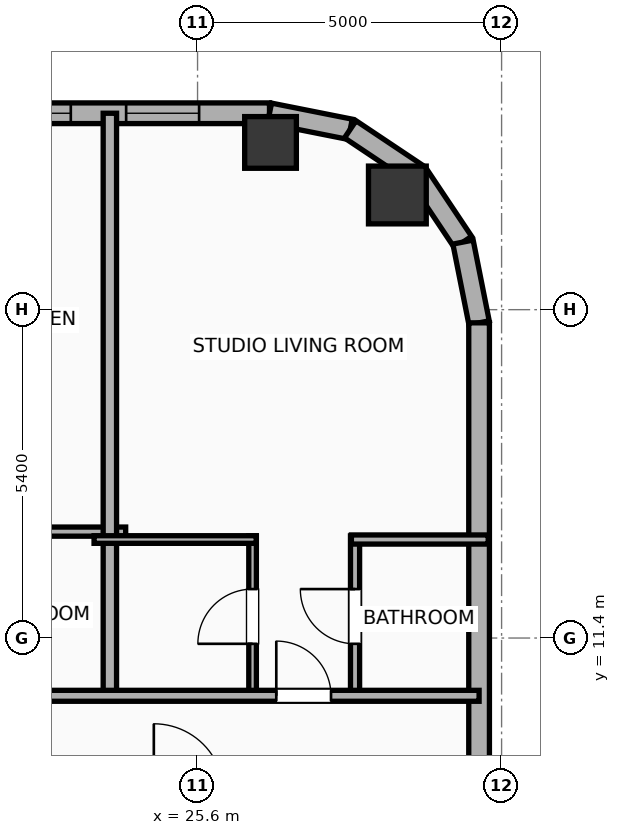
"""IFC4 building model, lengths in metres.
Left out: names, types, materials, properties, quantities, classifications, styles, units other than length and angle.
Written with IfcOpenShell. Run it as: python <this file> out.ifc"""

import sys

from ifc_helpers import new_model, si_unit, direction, frame, frame_2d, origin, origin_2d, place, context, subcontext, project, spatial, rectangle, hollow_rectangle, hollow_circle, extrude, element, fill, save


model = new_model("IFC4")
c1 = context("Model", 3, precision=1e-05, world=origin(), true_north=direction((0.0, 1.0)))
c2 = subcontext(c1, "Body", "Model", "MODEL_VIEW")
j1 = project(units=[si_unit("LENGTHUNIT", "METRE"), si_unit("PLANEANGLEUNIT", "RADIAN")], contexts=[c1])
p1 = place(None, origin())
s1 = spatial("IfcSite", under=j1, at=p1, CompositionType="ELEMENT")
p2 = place(p1, origin())
s2 = spatial("IfcBuilding", under=s1, at=p2, CompositionType="ELEMENT")
p3 = place(p2, frame((0.0, 0.0, 250.9)))
s3 = spatial("IfcBuildingStorey", under=s2, at=p3, CompositionType="ELEMENT", Elevation=250.9)
p4 = place(p3, frame((28.886, 18.686, 0.0), z_axis=(0.0, 0.0, 1.0), x_axis=(1.0, 0.0, 0.0)))
e1 = element("IfcColumn", 1, at=p4, inside=s3, PredefinedType="COLUMN", context=c2, shape_type="SweptSolid", body=[
    extrude(hollow_circle(Radius=0.475, WallThickness=0.032, at=origin_2d()), origin(), (0.0, 0.0, 1.0), 3.865),
])
p5 = place(p3, frame((26.8, 19.55, 0.0), z_axis=(0.0, 0.0, 1.0), x_axis=(1.0, 0.0, 0.0)))
e2 = element("IfcColumn", 2, at=p5, inside=s3, PredefinedType="COLUMN", context=c2, shape_type="SweptSolid", body=[
    extrude(hollow_rectangle(XDim=0.85, YDim=0.85, WallThickness=0.028, at=origin_2d()), origin(), (0.0, 0.0, 1.0), 3.865),
])
p6 = place(p3, frame((-22.783, 20.03, 0.0), z_axis=(0.0, 0.0, 1.0), x_axis=(1.0, 0.0, 0.0)))
e3 = element("IfcWall", 3, at=p6, inside=s3, PredefinedType="ELEMENTEDWALL", context=c2, shape_type="SweptSolid", body=[
    extrude(rectangle(XDim=49.566, YDim=0.34, at=frame_2d((24.783, 0.0))), origin(), (0.0, 0.0, 1.0), 2.39),
])
p7 = place(p6, frame((25.233, 0.0, 0.75)))
e4 = element("IfcOpeningElement", 4, at=p7, cuts=e3, PredefinedType="OPENING", context=c2, shape_type="SweptSolid", body=[
    extrude(rectangle(XDim=2.4, YDim=1.45, at=frame_2d((1.2, 0.725))), frame((0.0, 0.18, 0.0), z_axis=(0.0, -1.0, 0.0), x_axis=(1.0, 0.0, 0.0)), (0.0, 0.0, 1.0), 0.36),
])
p8 = place(p6, frame((41.756, 0.0, 0.75)))
e5 = element("IfcOpeningElement", 5, at=p8, cuts=e3, PredefinedType="OPENING", context=c2, shape_type="SweptSolid", body=[
    extrude(rectangle(XDim=2.4, YDim=1.45, at=frame_2d((1.2, 0.725))), frame((0.0, 0.18, 0.0), z_axis=(0.0, -1.0, 0.0), x_axis=(1.0, 0.0, 0.0)), (0.0, 0.0, 1.0), 0.36),
])
p9 = place(p6, frame((1.637, 0.0, 0.55)))
e6 = element("IfcOpeningElement", 6, at=p9, cuts=e3, PredefinedType="OPENING", context=c2, shape_type="SweptSolid", body=[
    extrude(rectangle(XDim=1.2, YDim=1.15, at=frame_2d((0.6, 0.575))), frame((0.0, 0.18, 0.0), z_axis=(0.0, -1.0, 0.0), x_axis=(1.0, 0.0, 0.0)), (0.0, 0.0, 1.0), 0.36),
])
p10 = place(p6, frame((8.019, 0.0, 0.55)))
e7 = element("IfcOpeningElement", 7, at=p10, cuts=e3, PredefinedType="OPENING", context=c2, shape_type="SweptSolid", body=[
    extrude(rectangle(XDim=1.2, YDim=1.15, at=frame_2d((0.6, 0.575))), frame((0.0, 0.18, 0.0), z_axis=(0.0, -1.0, 0.0), x_axis=(1.0, 0.0, 0.0)), (0.0, 0.0, 1.0), 0.36),
])
p11 = place(p6, frame((4.524, 0.0, 0.55)))
e8 = element("IfcOpeningElement", 8, at=p11, cuts=e3, PredefinedType="OPENING", context=c2, shape_type="SweptSolid", body=[
    extrude(rectangle(XDim=1.2, YDim=1.15, at=frame_2d((0.6, 0.575))), frame((0.0, 0.18, 0.0), z_axis=(0.0, -1.0, 0.0), x_axis=(1.0, 0.0, 0.0)), (0.0, 0.0, 1.0), 0.36),
])
p12 = place(p6, frame((11.678, 0.0, 0.55)))
e9 = element("IfcOpeningElement", 9, at=p12, cuts=e3, PredefinedType="OPENING", context=c2, shape_type="SweptSolid", body=[
    extrude(rectangle(XDim=1.2, YDim=1.15, at=frame_2d((0.6, 0.575))), frame((0.0, 0.18, 0.0), z_axis=(0.0, -1.0, 0.0), x_axis=(1.0, 0.0, 0.0)), (0.0, 0.0, 1.0), 0.36),
])
p13 = place(p6, frame((17.993, 0.0, 0.55)))
e10 = element("IfcOpeningElement", 10, at=p13, cuts=e3, PredefinedType="OPENING", context=c2, shape_type="SweptSolid", body=[
    extrude(rectangle(XDim=1.2, YDim=1.15, at=frame_2d((0.6, 0.575))), frame((0.0, 0.18, 0.0), z_axis=(0.0, -1.0, 0.0), x_axis=(1.0, 0.0, 0.0)), (0.0, 0.0, 1.0), 0.36),
])
p14 = place(p6, frame((15.138, 0.0, 0.55)))
e11 = element("IfcOpeningElement", 11, at=p14, cuts=e3, PredefinedType="OPENING", context=c2, shape_type="SweptSolid", body=[
    extrude(rectangle(XDim=1.2, YDim=1.15, at=frame_2d((0.6, 0.575))), frame((0.0, 0.18, 0.0), z_axis=(0.0, -1.0, 0.0), x_axis=(1.0, 0.0, 0.0)), (0.0, 0.0, 1.0), 0.36),
])
p15 = place(p6, frame((22.278, 0.0, 0.55)))
e12 = element("IfcOpeningElement", 12, at=p15, cuts=e3, PredefinedType="OPENING", context=c2, shape_type="SweptSolid", body=[
    extrude(rectangle(XDim=1.2, YDim=1.15, at=frame_2d((0.6, 0.575))), frame((0.0, 0.18, 0.0), z_axis=(0.0, -1.0, 0.0), x_axis=(1.0, 0.0, 0.0)), (0.0, 0.0, 1.0), 0.36),
])
p16 = place(p6, frame((30.384, 0.0, 0.55)))
e13 = element("IfcOpeningElement", 13, at=p16, cuts=e3, PredefinedType="OPENING", context=c2, shape_type="SweptSolid", body=[
    extrude(rectangle(XDim=0.85, YDim=1.15, at=frame_2d((0.425, 0.575))), frame((0.0, 0.18, 0.0), z_axis=(0.0, -1.0, 0.0), x_axis=(1.0, 0.0, 0.0)), (0.0, 0.0, 1.0), 0.36),
])
p17 = place(p6, frame((32.603, 0.0, 0.55)))
e14 = element("IfcOpeningElement", 14, at=p17, cuts=e3, PredefinedType="OPENING", context=c2, shape_type="SweptSolid", body=[
    extrude(rectangle(XDim=1.2, YDim=1.15, at=frame_2d((0.6, 0.575))), frame((0.0, 0.18, 0.0), z_axis=(0.0, -1.0, 0.0), x_axis=(1.0, 0.0, 0.0)), (0.0, 0.0, 1.0), 0.36),
])
p18 = place(p6, frame((37.223, 0.0, 0.55)))
e15 = element("IfcOpeningElement", 15, at=p18, cuts=e3, PredefinedType="OPENING", context=c2, shape_type="SweptSolid", body=[
    extrude(rectangle(XDim=1.2, YDim=1.15, at=frame_2d((0.6, 0.575))), frame((0.0, 0.18, 0.0), z_axis=(0.0, -1.0, 0.0), x_axis=(1.0, 0.0, 0.0)), (0.0, 0.0, 1.0), 0.36),
])
p19 = place(p6, frame((45.099, 0.0, 0.55)))
e16 = element("IfcOpeningElement", 16, at=p19, cuts=e3, PredefinedType="OPENING", context=c2, shape_type="SweptSolid", body=[
    extrude(rectangle(XDim=1.2, YDim=1.15, at=frame_2d((0.6, 0.575))), frame((0.0, 0.18, 0.0), z_axis=(0.0, -1.0, 0.0), x_axis=(1.0, 0.0, 0.0)), (0.0, 0.0, 1.0), 0.36),
])
p20 = place(p6, frame((47.209, 0.0, 0.55)))
e17 = element("IfcOpeningElement", 17, at=p20, cuts=e3, PredefinedType="OPENING", context=c2, shape_type="SweptSolid", body=[
    extrude(rectangle(XDim=1.2, YDim=1.15, at=frame_2d((0.6, 0.575))), frame((0.0, 0.18, 0.0), z_axis=(0.0, -1.0, 0.0), x_axis=(1.0, 0.0, 0.0)), (0.0, 0.0, 1.0), 0.36),
])
p21 = place(p3, frame((26.783, 20.03, 0.0), z_axis=(0.0, 0.0, 1.0), x_axis=(0.980788153188, -0.195075878998, 0.0)))
e18 = element("IfcWall", 18, at=p21, inside=s3, PredefinedType="ELEMENTEDWALL", context=c2, shape_type="SweptSolid", body=[
    extrude(rectangle(XDim=1.354, YDim=0.34, at=frame_2d((0.677, 0.0))), origin(), (0.0, 0.0, 1.0), 2.39),
])
p22 = place(p3, frame((28.111, 19.766, 0.0), z_axis=(0.0, 0.0, 1.0), x_axis=(0.831403586725, -0.555669034571, 0.0)))
e19 = element("IfcWall", 19, at=p22, inside=s3, PredefinedType="ELEMENTEDWALL", context=c2, shape_type="SweptSolid", body=[
    extrude(rectangle(XDim=1.337, YDim=0.34, at=frame_2d((0.668, 0.0))), origin(), (0.0, 0.0, 1.0), 2.39),
])
p23 = place(p3, frame((29.223, 19.023, 0.0), z_axis=(0.0, 0.0, 1.0), x_axis=(0.555669034571, -0.831403586725, 0.0)))
e20 = element("IfcWall", 20, at=p23, inside=s3, PredefinedType="ELEMENTEDWALL", context=c2, shape_type="SweptSolid", body=[
    extrude(rectangle(XDim=1.337, YDim=0.34, at=frame_2d((0.668, 0.0))), origin(), (0.0, 0.0, 1.0), 3.5),
])
p24 = place(p3, frame((29.966, 17.911, 0.0), z_axis=(0.0, 0.0, 1.0), x_axis=(0.195075878998, -0.980788153188, 0.0)))
e21 = element("IfcWall", 21, at=p24, inside=s3, PredefinedType="ELEMENTEDWALL", context=c2, shape_type="SweptSolid", body=[
    extrude(rectangle(XDim=1.354, YDim=0.34, at=frame_2d((0.677, 0.0))), origin(), (0.0, 0.0, 1.0), 3.5),
])
p25 = place(p3, frame((30.23, 16.583, 0.0), z_axis=(0.0, 0.0, 1.0), x_axis=(0.0, -1.0, 0.0)))
e22 = element("IfcWall", 22, at=p25, inside=s3, PredefinedType="ELEMENTEDWALL", context=c2, shape_type="SweptSolid", body=[
    extrude(rectangle(XDim=31.967, YDim=0.34, at=frame_2d((15.983, 0.0))), origin(), (0.0, 0.0, 1.0), 2.39),
])
p26 = place(p25, frame((30.106, 0.0, 0.55)))
e23 = element("IfcOpeningElement", 23, at=p26, cuts=e22, PredefinedType="OPENING", context=c2, shape_type="SweptSolid", body=[
    extrude(rectangle(XDim=1.2, YDim=1.15, at=frame_2d((0.6, 0.575))), frame((0.0, 0.18, 0.0), z_axis=(0.0, -1.0, 0.0), x_axis=(1.0, 0.0, 0.0)), (0.0, 0.0, 1.0), 0.36),
])
p27 = place(p25, frame((11.463, 0.0, 0.55)))
e24 = element("IfcOpeningElement", 24, at=p27, cuts=e22, PredefinedType="OPENING", context=c2, shape_type="SweptSolid", body=[
    extrude(rectangle(XDim=1.2, YDim=1.15, at=frame_2d((0.6, 0.575))), frame((0.0, 0.18, 0.0), z_axis=(0.0, -1.0, 0.0), x_axis=(1.0, 0.0, 0.0)), (0.0, 0.0, 1.0), 0.36),
])
p28 = place(p25, frame((20.363, 0.0, 0.55)))
e25 = element("IfcOpeningElement", 25, at=p28, cuts=e22, PredefinedType="OPENING", context=c2, shape_type="SweptSolid", body=[
    extrude(rectangle(XDim=1.2, YDim=1.15, at=frame_2d((0.6, 0.575))), frame((0.0, 0.18, 0.0), z_axis=(0.0, -1.0, 0.0), x_axis=(1.0, 0.0, 0.0)), (0.0, 0.0, 1.0), 0.36),
])
p29 = place(p3, frame((21.593, 13.15, 0.0), z_axis=(0.0, 0.0, 1.0), x_axis=(1.0, 0.0, 0.0)))
e26 = element("IfcWall", 26, at=p29, inside=s3, PredefinedType="PLUMBINGWALL", context=c2, shape_type="SweptSolid", body=[
    extrude(rectangle(XDim=2.825, YDim=0.15, at=frame_2d((1.413, 0.0))), origin(), (0.0, 0.0, 1.0), 3.5),
])
p30 = place(p3, frame((24.158, 10.37, 0.0), z_axis=(0.0, 0.0, 1.0), x_axis=(0.0, 1.0, 0.0)))
e27 = element("IfcWall", 27, at=p30, inside=s3, PredefinedType="PARTITIONING", context=c2, shape_type="SweptSolid", body=[
    extrude(rectangle(XDim=9.66, YDim=0.22, at=frame_2d((4.83, 0.0))), origin(), (0.0, 0.0, 1.0), 2.39),
])
p31 = place(p3, frame((26.505, 10.43, 0.0), z_axis=(0.0, 0.0, 1.0), x_axis=(0.0, 1.0, 0.0)))
e28 = element("IfcWall", 28, at=p31, inside=s3, PredefinedType="PARTITIONING", context=c2, shape_type="SweptSolid", body=[
    extrude(rectangle(XDim=2.65, YDim=0.125, at=frame_2d((1.325, 0.0))), origin(), (0.0, 0.0, 1.0), 3.5),
])
p32 = place(p31, frame((0.875, 0.0, 0.0)))
e29 = element("IfcOpeningElement", 29, at=p32, cuts=e28, PredefinedType="OPENING", context=c2, shape_type="SweptSolid", body=[
    extrude(rectangle(XDim=0.9, YDim=2.05, at=frame_2d((0.45, 1.025))), frame((0.0, 0.073, 0.0), z_axis=(0.0, -1.0, 0.0), x_axis=(1.0, 0.0, 0.0)), (0.0, 0.0, 1.0), 0.145),
])
p33 = place(p3, frame((28.19, 10.43, 0.0), z_axis=(0.0, 0.0, 1.0), x_axis=(0.0, 1.0, 0.0)))
e30 = element("IfcWall", 30, at=p33, inside=s3, PredefinedType="PLUMBINGWALL", context=c2, shape_type="SweptSolid", body=[
    extrude(rectangle(XDim=2.65, YDim=0.15, at=frame_2d((1.325, 0.0))), origin(), (0.0, 0.0, 1.0), 3.5),
])
p34 = place(p33, frame((0.875, 0.0, 0.0)))
e31 = element("IfcOpeningElement", 31, at=p34, cuts=e30, PredefinedType="OPENING", context=c2, shape_type="SweptSolid", body=[
    extrude(rectangle(XDim=0.9, YDim=2.05, at=frame_2d((0.45, 1.025))), frame((0.0, 0.085, 0.0), z_axis=(0.0, -1.0, 0.0), x_axis=(1.0, 0.0, 0.0)), (0.0, 0.0, 1.0), 0.17),
])
p35 = place(p3, frame((23.898, 13.02, 0.0), z_axis=(0.0, 0.0, 1.0), x_axis=(1.0, 0.0, 0.0)))
e32 = element("IfcWall", 32, at=p35, inside=s3, PredefinedType="PARTITIONING", context=c2, shape_type="SweptSolid", body=[
    extrude(rectangle(XDim=2.667, YDim=0.125, at=frame_2d((1.333, 0.0))), origin(), (0.0, 0.0, 1.0), 3.5),
])
p36 = place(p3, frame((28.13, 13.02, 0.0), z_axis=(0.0, 0.0, 1.0), x_axis=(1.0, 0.0, 0.0)))
e33 = element("IfcWall", 33, at=p36, inside=s3, PredefinedType="PLUMBINGWALL", context=c2, shape_type="SweptSolid", body=[
    extrude(rectangle(XDim=2.25, YDim=0.15, at=frame_2d((1.125, 0.0))), origin(), (0.0, 0.0, 1.0), 3.5),
])
p37 = place(p3, frame((-26.23, 10.45, 0.0), z_axis=(0.0, 0.0, 1.0), x_axis=(1.0, 0.0, 0.0)))
e34 = element("IfcWall", 34, at=p37, inside=s3, PredefinedType="PARTITIONING", context=c2, shape_type="SweptSolid", body=[
    extrude(rectangle(XDim=56.46, YDim=0.18, at=frame_2d((28.23, 0.0))), origin(), (0.0, 0.0, 1.0), 3.5),
])
p38 = place(p37, frame((3.072, 0.0, 0.0)))
e35 = element("IfcOpeningElement", 35, at=p38, cuts=e34, PredefinedType="OPENING", context=c2, shape_type="SweptSolid", body=[
    extrude(rectangle(XDim=1.15, YDim=2.05, at=frame_2d((0.575, 1.025))), frame((0.0, 0.1, 0.0), z_axis=(0.0, -1.0, 0.0), x_axis=(1.0, 0.0, 0.0)), (0.0, 0.0, 1.0), 0.2),
])
p39 = place(p37, frame((12.146, 0.0, 0.0)))
e36 = element("IfcOpeningElement", 36, at=p39, cuts=e34, PredefinedType="OPENING", context=c2, shape_type="SweptSolid", body=[
    extrude(rectangle(XDim=1.15, YDim=2.05, at=frame_2d((0.575, 1.025))), frame((0.0, 0.1, 0.0), z_axis=(0.0, -1.0, 0.0), x_axis=(1.0, 0.0, 0.0)), (0.0, 0.0, 1.0), 0.2),
])
p40 = place(p37, frame((22.302, 0.0, 0.0)))
e37 = element("IfcOpeningElement", 37, at=p40, cuts=e34, PredefinedType="OPENING", context=c2, shape_type="SweptSolid", body=[
    extrude(rectangle(XDim=1.15, YDim=2.05, at=frame_2d((0.575, 1.025))), frame((0.0, 0.1, 0.0), z_axis=(0.0, -1.0, 0.0), x_axis=(1.0, 0.0, 0.0)), (0.0, 0.0, 1.0), 0.2),
])
p41 = place(p37, frame((32.601, 0.0, 0.0)))
e38 = element("IfcOpeningElement", 38, at=p41, cuts=e34, PredefinedType="OPENING", context=c2, shape_type="SweptSolid", body=[
    extrude(rectangle(XDim=1.15, YDim=2.05, at=frame_2d((0.575, 1.025))), frame((0.0, 0.1, 0.0), z_axis=(0.0, -1.0, 0.0), x_axis=(1.0, 0.0, 0.0)), (0.0, 0.0, 1.0), 0.2),
])
p42 = place(p37, frame((40.941, 0.0, 0.0)))
e39 = element("IfcOpeningElement", 39, at=p42, cuts=e34, PredefinedType="OPENING", context=c2, shape_type="SweptSolid", body=[
    extrude(rectangle(XDim=0.9, YDim=2.05, at=frame_2d((0.45, 1.025))), frame((0.0, 0.1, 0.0), z_axis=(0.0, -1.0, 0.0), x_axis=(1.0, 0.0, 0.0)), (0.0, 0.0, 1.0), 0.2),
])
p43 = place(p37, frame((45.559, 0.0, 0.0)))
e40 = element("IfcOpeningElement", 40, at=p43, cuts=e34, PredefinedType="OPENING", context=c2, shape_type="SweptSolid", body=[
    extrude(rectangle(XDim=1.15, YDim=2.05, at=frame_2d((0.575, 1.025))), frame((0.0, 0.1, 0.0), z_axis=(0.0, -1.0, 0.0), x_axis=(1.0, 0.0, 0.0)), (0.0, 0.0, 1.0), 0.2),
])
p44 = place(p37, frame((53.125, 0.0, 0.0)))
e41 = element("IfcOpeningElement", 41, at=p44, cuts=e34, PredefinedType="OPENING", context=c2, shape_type="SweptSolid", body=[
    extrude(rectangle(XDim=0.9, YDim=2.05, at=frame_2d((0.45, 1.025))), frame((0.0, 0.1, 0.0), z_axis=(0.0, -1.0, 0.0), x_axis=(1.0, 0.0, 0.0)), (0.0, 0.0, 1.0), 0.2),
])
p45 = place(p19, origin())
e42 = element("IfcWindow", 42, at=p45, inside=s3, PartitioningType="SINGLE_PANEL", PredefinedType="WINDOW", context=c2, shape_type="SweptSolid", body=[
    extrude(rectangle(XDim=1.2, YDim=1.15, at=frame_2d((0.6, 0.575))), frame((0.0, 0.03, 0.0), z_axis=(0.0, -1.0, 0.0), x_axis=(1.0, 0.0, 0.0)), (0.0, 0.0, 1.0), 0.06),
])
fill(e16, e42)
p46 = place(p20, origin())
e43 = element("IfcWindow", 43, at=p46, inside=s3, PartitioningType="SINGLE_PANEL", PredefinedType="WINDOW", context=c2, shape_type="SweptSolid", body=[
    extrude(rectangle(XDim=1.2, YDim=1.15, at=frame_2d((0.6, 0.575))), frame((0.0, 0.03, 0.0), z_axis=(0.0, -1.0, 0.0), x_axis=(1.0, 0.0, 0.0)), (0.0, 0.0, 1.0), 0.06),
])
fill(e17, e43)
p47 = place(p32, origin())
e44 = element("IfcDoor", 44, at=p47, inside=s3, OperationType="SINGLE_SWING_LEFT", PredefinedType="DOOR", context=c2, shape_type="SweptSolid", body=[
    extrude(rectangle(XDim=0.9, YDim=2.05, at=frame_2d((0.45, 1.025))), frame((0.0, 0.025, 0.0), z_axis=(0.0, -1.0, 0.0), x_axis=(1.0, 0.0, 0.0)), (0.0, 0.0, 1.0), 0.05),
])
fill(e29, e44)
p48 = place(p34, origin())
e45 = element("IfcDoor", 45, at=p48, inside=s3, OperationType="SINGLE_SWING_RIGHT", PredefinedType="DOOR", context=c2, shape_type="SweptSolid", body=[
    extrude(rectangle(XDim=0.9, YDim=2.05, at=frame_2d((0.45, 1.025))), frame((0.0, 0.025, 0.0), z_axis=(0.0, -1.0, 0.0), x_axis=(1.0, 0.0, 0.0)), (0.0, 0.0, 1.0), 0.05),
])
fill(e31, e45)
p49 = place(p44, origin())
e46 = element("IfcDoor", 46, at=p49, inside=s3, OperationType="SINGLE_SWING_LEFT", PredefinedType="DOOR", context=c2, shape_type="SweptSolid", body=[
    extrude(rectangle(XDim=0.9, YDim=2.05, at=frame_2d((0.45, 1.025))), frame((0.0, 0.025, 0.0), z_axis=(0.0, -1.0, 0.0), x_axis=(1.0, 0.0, 0.0)), (0.0, 0.0, 1.0), 0.05),
])
fill(e41, e46)
save(model, sys.argv[1])
